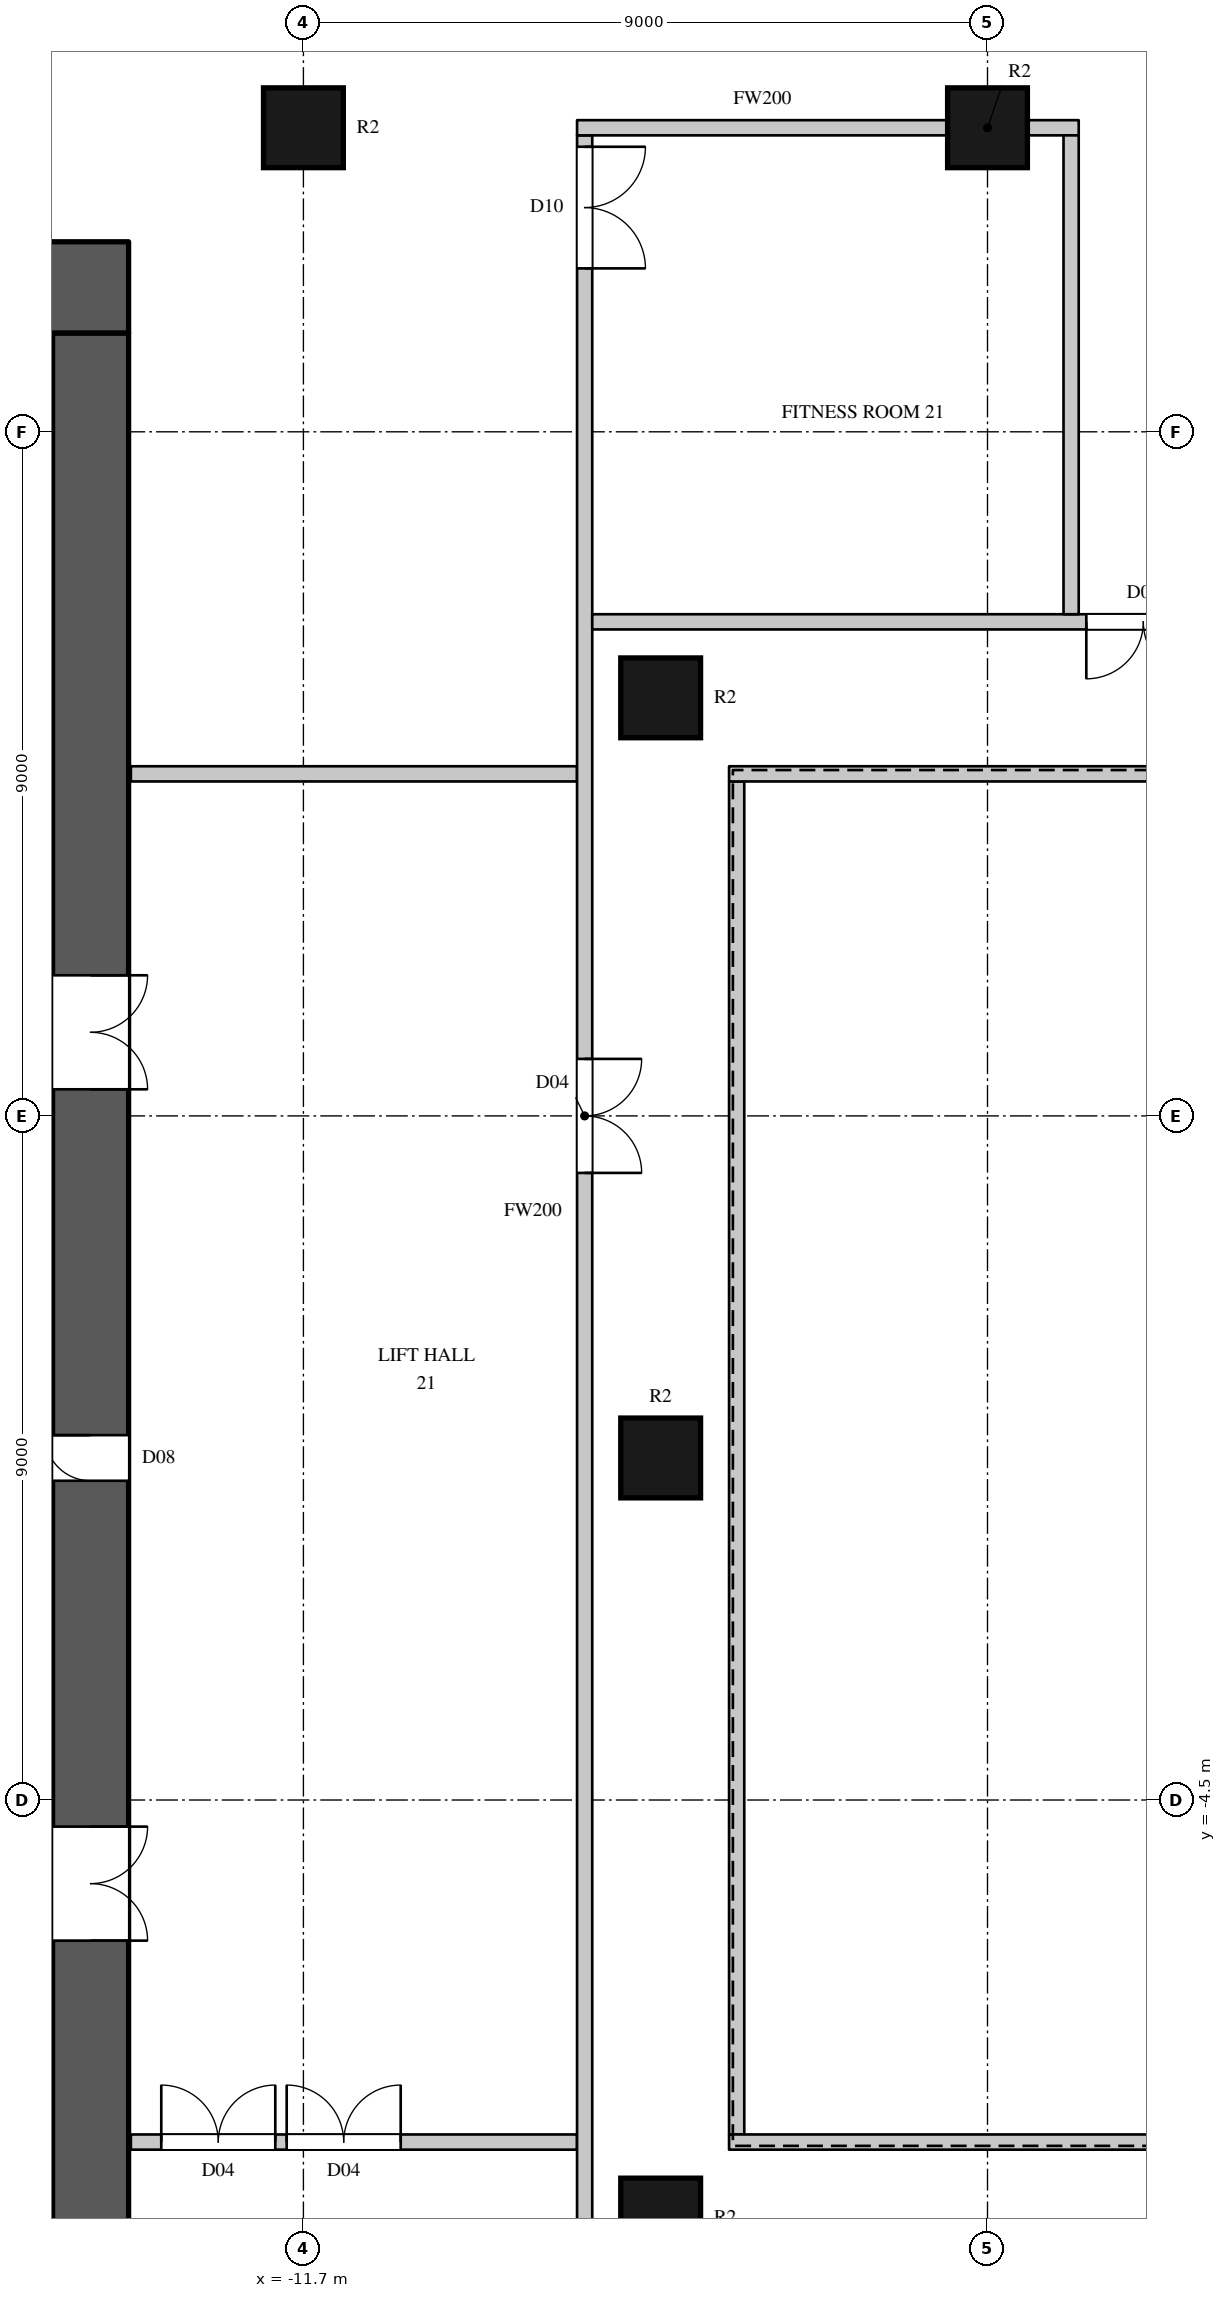
"""IFC4 building model, lengths in metres.
Left out: names, types, materials, properties, quantities, classifications, styles, units other than length and angle.
Written with IfcOpenShell. Run it as: python <this file> out.ifc"""

import sys

from ifc_helpers import new_model, si_unit, direction, frame, frame_2d, origin, origin_2d, place, context, subcontext, project, spatial, rectangle, circle, extrude, element, fill, save


model = new_model("IFC4")
c1 = context("Model", 3, precision=1e-05, world=origin(), true_north=direction((0.0, 1.0)))
c2 = subcontext(c1, "Body", "Model", "MODEL_VIEW")
j1 = project(units=[si_unit("LENGTHUNIT", "METRE"), si_unit("PLANEANGLEUNIT", "RADIAN")], contexts=[c1])
p1 = place(None, origin())
s1 = spatial("IfcSite", under=j1, at=p1, CompositionType="ELEMENT")
p2 = place(p1, origin())
s2 = spatial("IfcBuilding", under=s1, at=p2, CompositionType="ELEMENT")
p3 = place(p2, frame((0.0, 0.0, 105.9)))
s3 = spatial("IfcBuildingStorey", under=s2, at=p3, CompositionType="ELEMENT", Elevation=105.9)
for number, where, z_axis, x_axis in (
    (1, (-11.7, 17.5, 0.0), (0.0, 0.0, 1.0), (1.0, 0.0, 0.0)),
    (2, (-2.7, 17.5, 0.0), (0.0, 0.0, 1.0), (1.0, 0.0, 0.0)),
    (3, (-7.0, -10.0, 0.0), (0.0, 0.0, 1.0), (1.0, 0.0, 0.0)),
    (4, (-7.0, 0.0, 0.0), (0.0, 0.0, 1.0), (1.0, 0.0, 0.0)),
    (5, (-7.0, 10.0, 0.0), (0.0, 0.0, 1.0), (1.0, 0.0, 0.0)),
):
    element("IfcColumn", number, at=place(p3, frame(where, z_axis=z_axis, x_axis=x_axis)), inside=s3, PredefinedType="COLUMN", context=c2, shape_type="SweptSolid", body=[
        extrude(circle(Radius=0.525, at=origin_2d()), origin(), (0.0, 0.0, 1.0), 3.6),
    ])
p4 = place(p3, frame((-30.0, 15.4, 0.0), z_axis=(0.0, 0.0, 1.0), x_axis=(1.0, 0.0, 0.0)))
e6 = element("IfcWall", 6, at=p4, inside=s3, PredefinedType="SHEAR", context=c2, shape_type="SweptSolid", body=[
    extrude(rectangle(XDim=16.0, YDim=1.2, at=frame_2d((8.0, 0.0))), origin(), (0.0, 0.0, 1.0), 3.6),
])
p5 = place(p4, frame((13.4, 0.0, 0.0)))
e7 = element("IfcOpeningElement", 7, at=p5, cuts=e6, PredefinedType="OPENING", context=c2, shape_type="SweptSolid", body=[
    extrude(rectangle(XDim=1.5, YDim=2.4, at=frame_2d((0.75, 1.2))), frame((0.0, 0.61, 0.0), z_axis=(0.0, -1.0, 0.0), x_axis=(1.0, 0.0, 0.0)), (0.0, 0.0, 1.0), 1.22),
])
p6 = place(p3, frame((-14.5, -14.8, 0.0), z_axis=(0.0, 0.0, 1.0), x_axis=(0.0, 1.0, 0.0)))
e8 = element("IfcWall", 8, at=p6, inside=s3, PredefinedType="SHEAR", context=c2, shape_type="SweptSolid", body=[
    extrude(rectangle(XDim=29.6, YDim=1.0, at=frame_2d((14.8, 0.0))), origin(), (0.0, 0.0, 1.0), 3.6),
])
p7 = place(p6, frame((8.45, 0.0, 0.0)))
e9 = element("IfcOpeningElement", 9, at=p7, cuts=e8, PredefinedType="OPENING", context=c2, shape_type="SweptSolid", body=[
    extrude(rectangle(XDim=1.5, YDim=2.4, at=frame_2d((0.75, 1.2))), frame((0.0, 0.51, 0.0), z_axis=(0.0, -1.0, 0.0), x_axis=(1.0, 0.0, 0.0)), (0.0, 0.0, 1.0), 1.02),
])
p8 = place(p6, frame((19.65, 0.0, 0.0)))
e10 = element("IfcOpeningElement", 10, at=p8, cuts=e8, PredefinedType="OPENING", context=c2, shape_type="SweptSolid", body=[
    extrude(rectangle(XDim=1.5, YDim=2.4, at=frame_2d((0.75, 1.2))), frame((0.0, 0.51, 0.0), z_axis=(0.0, -1.0, 0.0), x_axis=(1.0, 0.0, 0.0)), (0.0, 0.0, 1.0), 1.02),
])
p9 = place(p6, frame((14.5, 0.0, 0.0)))
e11 = element("IfcOpeningElement", 11, at=p9, cuts=e8, PredefinedType="OPENING", context=c2, shape_type="SweptSolid", body=[
    extrude(rectangle(XDim=0.6, YDim=2.0, at=frame_2d((0.3, 1.0))), frame((0.0, 0.51, 0.0), z_axis=(0.0, -1.0, 0.0), x_axis=(1.0, 0.0, 0.0)), (0.0, 0.0, 1.0), 1.02),
])
p10 = place(p3, frame((-13.97, -9.0, 0.0), z_axis=(0.0, 0.0, 1.0), x_axis=(1.0, 0.0, 0.0)))
e12 = element("IfcWall", 12, at=p10, inside=s3, PredefinedType="PARTITIONING", context=c2, shape_type="SweptSolid", body=[
    extrude(rectangle(XDim=5.87, YDim=0.2, at=frame_2d((2.935, 0.0))), origin(), (0.0, 0.0, 1.0), 3.3),
])
p11 = place(p10, frame((0.4, 0.0, 0.0)))
e13 = element("IfcOpeningElement", 13, at=p11, cuts=e12, PredefinedType="OPENING", context=c2, shape_type="SweptSolid", body=[
    extrude(rectangle(XDim=1.5, YDim=2.2, at=frame_2d((0.75, 1.1))), frame((0.0, 0.11, 0.0), z_axis=(0.0, -1.0, 0.0), x_axis=(1.0, 0.0, 0.0)), (0.0, 0.0, 1.0), 0.22),
])
p12 = place(p10, frame((2.05, 0.0, 0.0)))
e14 = element("IfcOpeningElement", 14, at=p12, cuts=e12, PredefinedType="OPENING", context=c2, shape_type="SweptSolid", body=[
    extrude(rectangle(XDim=1.5, YDim=2.2, at=frame_2d((0.75, 1.1))), frame((0.0, 0.11, 0.0), z_axis=(0.0, -1.0, 0.0), x_axis=(1.0, 0.0, 0.0)), (0.0, 0.0, 1.0), 0.22),
])
p13 = place(p3, frame((-13.97, 9.0, 0.0), z_axis=(0.0, 0.0, 1.0), x_axis=(1.0, 0.0, 0.0)))
e15 = element("IfcWall", 15, at=p13, inside=s3, PredefinedType="PARTITIONING", context=c2, shape_type="SweptSolid", body=[
    extrude(rectangle(XDim=5.87, YDim=0.2, at=frame_2d((2.935, 0.0))), origin(), (0.0, 0.0, 1.0), 3.3),
])
p14 = place(p3, frame((-8.0, -10.9, 0.0), z_axis=(0.0, 0.0, 1.0), x_axis=(0.0, 1.0, 0.0)))
e16 = element("IfcWall", 16, at=p14, inside=s3, PredefinedType="PARTITIONING", context=c2, shape_type="SweptSolid", body=[
    extrude(rectangle(XDim=28.3, YDim=0.2, at=frame_2d((14.15, 0.0))), origin(), (0.0, 0.0, 1.0), 3.3),
])
p15 = place(p14, frame((14.65, 0.0, 0.0)))
e17 = element("IfcOpeningElement", 17, at=p15, cuts=e16, PredefinedType="OPENING", context=c2, shape_type="SweptSolid", body=[
    extrude(rectangle(XDim=1.5, YDim=2.2, at=frame_2d((0.75, 1.1))), frame((0.0, 0.11, 0.0), z_axis=(0.0, -1.0, 0.0), x_axis=(1.0, 0.0, 0.0)), (0.0, 0.0, 1.0), 0.22),
])
p16 = place(p14, frame((26.55, 0.0, 0.0)))
e18 = element("IfcOpeningElement", 18, at=p16, cuts=e16, PredefinedType="OPENING", context=c2, shape_type="SweptSolid", body=[
    extrude(rectangle(XDim=1.6, YDim=2.4, at=frame_2d((0.8, 1.2))), frame((0.0, 0.11, 0.0), z_axis=(0.0, -1.0, 0.0), x_axis=(1.0, 0.0, 0.0)), (0.0, 0.0, 1.0), 0.22),
])
p17 = place(p3, frame((-7.9, 11.0, 0.0), z_axis=(0.0, 0.0, 1.0), x_axis=(1.0, 0.0, 0.0)))
e19 = element("IfcWall", 19, at=p17, inside=s3, PredefinedType="PARTITIONING", context=c2, shape_type="SweptSolid", body=[
    extrude(rectangle(XDim=17.9, YDim=0.2, at=frame_2d((8.95, 0.0))), origin(), (0.0, 0.0, 1.0), 3.3),
])
p18 = place(p17, frame((6.5, 0.0, 0.0)))
e20 = element("IfcOpeningElement", 20, at=p18, cuts=e19, PredefinedType="OPENING", context=c2, shape_type="SweptSolid", body=[
    extrude(rectangle(XDim=1.5, YDim=2.2, at=frame_2d((0.75, 1.1))), frame((0.0, 0.11, 0.0), z_axis=(0.0, -1.0, 0.0), x_axis=(1.0, 0.0, 0.0)), (0.0, 0.0, 1.0), 0.22),
])
p19 = place(p3, frame((-8.1, 17.5, 0.0), z_axis=(0.0, 0.0, 1.0), x_axis=(1.0, 0.0, 0.0)))
e21 = element("IfcWall", 21, at=p19, inside=s3, PredefinedType="PARTITIONING", context=c2, shape_type="SweptSolid", body=[
    extrude(rectangle(XDim=4.875, YDim=0.2, at=frame_2d((2.438, 0.0))), origin(), (0.0, 0.0, 1.0), 2.75),
])
p20 = place(p3, frame((-2.175, 17.5, 0.0), z_axis=(0.0, 0.0, 1.0), x_axis=(1.0, 0.0, 0.0)))
e22 = element("IfcWall", 22, at=p20, inside=s3, PredefinedType="PARTITIONING", context=c2, shape_type="SweptSolid", body=[
    extrude(rectangle(XDim=0.675, YDim=0.2, at=frame_2d((0.337, 0.0))), origin(), (0.0, 0.0, 1.0), 2.75),
])
p21 = place(p3, frame((-6.0, -8.9, 0.0), z_axis=(0.0, 0.0, 1.0), x_axis=(0.0, 1.0, 0.0)))
e23 = element("IfcWall", 23, at=p21, inside=s3, PredefinedType="PARTITIONING", context=c2, shape_type="SweptSolid", body=[
    extrude(rectangle(XDim=17.8, YDim=0.2, at=frame_2d((8.9, 0.0))), origin(), (0.0, 0.0, 1.0), 3.3),
])
for number, where, z_axis, x_axis in (
    (24, (-6.1, -9.0, 0.0), (0.0, 0.0, 1.0), (1.0, 0.0, 0.0)),
    (25, (-6.1, 9.0, 0.0), (0.0, 0.0, 1.0), (1.0, 0.0, 0.0)),
):
    element("IfcWall", number, at=place(p3, frame(where, z_axis=z_axis, x_axis=x_axis)), inside=s3, PredefinedType="PARTITIONING", context=c2, shape_type="SweptSolid", body=[
        extrude(rectangle(XDim=14.2, YDim=0.2, at=frame_2d((7.1, 0.0))), origin(), (0.0, 0.0, 1.0), 3.3),
    ])
p22 = place(p3, frame((-1.6, 11.1, 0.0), z_axis=(0.0, 0.0, 1.0), x_axis=(0.0, 1.0, 0.0)))
e26 = element("IfcWall", 26, at=p22, inside=s3, PredefinedType="PARTITIONING", context=c2, shape_type="SweptSolid", body=[
    extrude(rectangle(XDim=6.3, YDim=0.2, at=frame_2d((3.15, 0.0))), origin(), (0.0, 0.0, 1.0), 3.3),
])
p23 = place(p15, origin())
e27 = element("IfcDoor", 27, at=p23, inside=s3, OperationType="DOUBLE_DOOR_SINGLE_SWING", PredefinedType="DOOR", context=c2, shape_type="SweptSolid", body=[
    extrude(rectangle(XDim=1.5, YDim=2.2, at=frame_2d((0.75, 1.1))), frame((0.0, 0.025, 0.0), z_axis=(0.0, -1.0, 0.0), x_axis=(1.0, 0.0, 0.0)), (0.0, 0.0, 1.0), 0.05),
])
fill(e17, e27)
p24 = place(p11, origin())
e28 = element("IfcDoor", 28, at=p24, inside=s3, OperationType="DOUBLE_DOOR_SINGLE_SWING", PredefinedType="DOOR", context=c2, shape_type="SweptSolid", body=[
    extrude(rectangle(XDim=1.5, YDim=2.2, at=frame_2d((0.75, 1.1))), frame((0.0, 0.025, 0.0), z_axis=(0.0, -1.0, 0.0), x_axis=(1.0, 0.0, 0.0)), (0.0, 0.0, 1.0), 0.05),
])
fill(e13, e28)
p25 = place(p12, origin())
e29 = element("IfcDoor", 29, at=p25, inside=s3, OperationType="DOUBLE_DOOR_SINGLE_SWING", PredefinedType="DOOR", context=c2, shape_type="SweptSolid", body=[
    extrude(rectangle(XDim=1.5, YDim=2.2, at=frame_2d((0.75, 1.1))), frame((0.0, 0.025, 0.0), z_axis=(0.0, -1.0, 0.0), x_axis=(1.0, 0.0, 0.0)), (0.0, 0.0, 1.0), 0.05),
])
fill(e14, e29)
p26 = place(p18, origin())
e30 = element("IfcDoor", 30, at=p26, inside=s3, OperationType="DOUBLE_DOOR_SINGLE_SWING", PredefinedType="DOOR", context=c2, shape_type="SweptSolid", body=[
    extrude(rectangle(XDim=1.5, YDim=2.2, at=frame_2d((0.75, 1.1))), frame((0.0, 0.025, 0.0), z_axis=(0.0, -1.0, 0.0), x_axis=(1.0, 0.0, 0.0)), (0.0, 0.0, 1.0), 0.05),
])
fill(e20, e30)
p27 = place(p16, origin())
e31 = element("IfcDoor", 31, at=p27, inside=s3, OperationType="DOUBLE_DOOR_SINGLE_SWING", PredefinedType="DOOR", context=c2, shape_type="SweptSolid", body=[
    extrude(rectangle(XDim=1.6, YDim=2.4, at=frame_2d((0.8, 1.2))), frame((0.0, 0.025, 0.0), z_axis=(0.0, -1.0, 0.0), x_axis=(1.0, 0.0, 0.0)), (0.0, 0.0, 1.0), 0.05),
])
fill(e18, e31)
p28 = place(p7, origin())
e32 = element("IfcDoor", 32, at=p28, inside=s3, OperationType="DOUBLE_DOOR_SINGLE_SWING", PredefinedType="DOOR", context=c2, shape_type="SweptSolid", body=[
    extrude(rectangle(XDim=1.5, YDim=2.4, at=frame_2d((0.75, 1.2))), frame((0.0, -0.445, 0.0), z_axis=(0.0, -1.0, 0.0), x_axis=(1.0, 0.0, 0.0)), (0.0, 0.0, 1.0), 0.05),
])
fill(e9, e32)
p29 = place(p8, origin())
e33 = element("IfcDoor", 33, at=p29, inside=s3, OperationType="DOUBLE_DOOR_SINGLE_SWING", PredefinedType="DOOR", context=c2, shape_type="SweptSolid", body=[
    extrude(rectangle(XDim=1.5, YDim=2.4, at=frame_2d((0.75, 1.2))), frame((0.0, -0.445, 0.0), z_axis=(0.0, -1.0, 0.0), x_axis=(1.0, 0.0, 0.0)), (0.0, 0.0, 1.0), 0.05),
])
fill(e10, e33)
p30 = place(p9, origin())
e34 = element("IfcDoor", 34, at=p30, inside=s3, OperationType="SINGLE_SWING_RIGHT", PredefinedType="DOOR", context=c2, shape_type="SweptSolid", body=[
    extrude(rectangle(XDim=0.6, YDim=2.0, at=frame_2d((0.3, 1.0))), frame((0.0, 0.495, 0.0), z_axis=(0.0, -1.0, 0.0), x_axis=(1.0, 0.0, 0.0)), (0.0, 0.0, 1.0), 0.05),
])
fill(e11, e34)
save(model, sys.argv[1])
